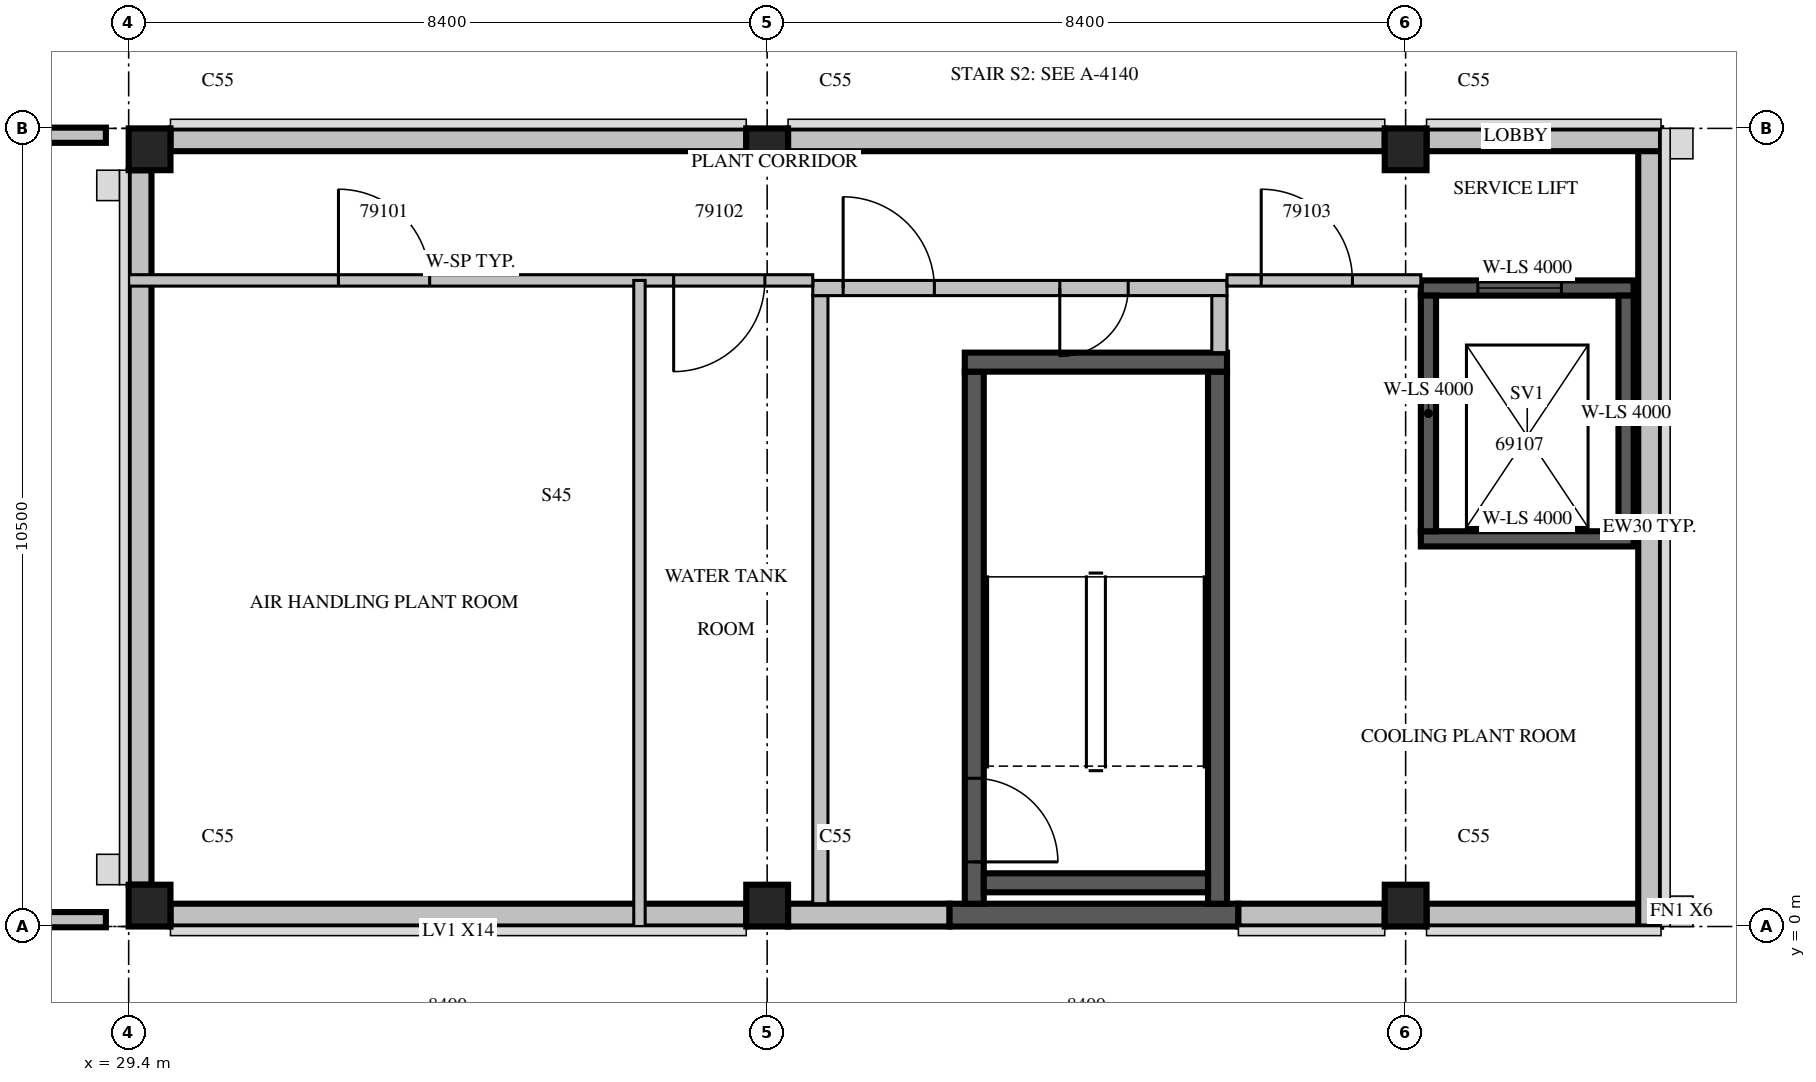
"""IFC4 building model, lengths in metres.
Left out: names, types, materials, properties, quantities, classifications, styles, units other than length and angle.
Written with IfcOpenShell. Run it as: python <this file> out.ifc"""

import sys

from ifc_helpers import new_model, si_unit, direction, frame, frame_2d, origin, origin_2d, place, context, subcontext, project, spatial, rectangle, extrude, source, transform, mapped, element, fill, save


model = new_model("IFC4")
c1 = context("Model", 3, precision=1e-05, world=origin(), true_north=direction((0.0, 1.0)))
c2 = subcontext(c1, "Body", "Model", "MODEL_VIEW")
j1 = project(units=[si_unit("LENGTHUNIT", "METRE"), si_unit("PLANEANGLEUNIT", "RADIAN")], contexts=[c1])
p1 = place(None, origin())
s1 = spatial("IfcSite", under=j1, at=p1, CompositionType="ELEMENT")
p2 = place(p1, origin())
s2 = spatial("IfcBuilding", under=s1, at=p2, CompositionType="ELEMENT")
p3 = place(p2, frame((0.0, 0.0, 368.5)))
s3 = spatial("IfcBuildingStorey", under=s2, at=p3, CompositionType="ELEMENT", Elevation=368.5)
p4 = place(p3, frame((29.675, 0.275, 0.0), z_axis=(0.0, 0.0, 1.0), x_axis=(1.0, 0.0, 0.0)))
e1 = element("IfcColumn", 1, at=p4, inside=s3, PredefinedType="COLUMN", context=c2, shape_type="SweptSolid", body=[
    extrude(rectangle(XDim=0.55, YDim=0.55, at=origin_2d()), origin(), (0.0, 0.0, 1.0), 4.0),
])
m1 = source(origin(), c2, "Body", "SweptSolid", [
    extrude(rectangle(XDim=0.55, YDim=0.55, at=origin_2d()), origin(), (0.0, 0.0, 1.0), 4.0),
])
for number, where, z_axis, x_axis in (
    (2, (37.8, 0.275, 0.0), (0.0, 0.0, 1.0), (1.0, 0.0, 0.0)),
    (3, (46.2, 0.275, 0.0), (0.0, 0.0, 1.0), (1.0, 0.0, 0.0)),
    (4, (29.675, 10.225, 0.0), (0.0, 0.0, 1.0), (1.0, 0.0, 0.0)),
    (5, (37.8, 10.225, 0.0), (0.0, 0.0, 1.0), (1.0, 0.0, 0.0)),
    (6, (46.2, 10.225, 0.0), (0.0, 0.0, 1.0), (1.0, 0.0, 0.0)),
):
    element("IfcColumn", number, at=place(p3, frame(where, z_axis=z_axis, x_axis=x_axis)), inside=s3, PredefinedType="COLUMN", context=c2, shape_type="MappedRepresentation", body=[
        mapped(m1, transform((0.0, 0.0, 0.0), scale=1.0)),
    ])
p5 = place(p3, frame((29.95, 0.15, 0.0), z_axis=(0.0, 0.0, 1.0), x_axis=(1.0, 0.0, 0.0)))
e7 = element("IfcWall", 7, at=p5, inside=s3, PredefinedType="STANDARD", context=c2, shape_type="SweptSolid", body=[
    extrude(rectangle(XDim=7.575, YDim=0.3, at=frame_2d((3.788, 0.0))), origin(), (0.0, 0.0, 1.0), 3.136),
])
p6 = place(p3, frame((38.075, 0.15, 0.0), z_axis=(0.0, 0.0, 1.0), x_axis=(1.0, 0.0, 0.0)))
e8 = element("IfcWall", 8, at=p6, inside=s3, PredefinedType="STANDARD", context=c2, shape_type="SweptSolid", body=[
    extrude(rectangle(XDim=2.125, YDim=0.3, at=frame_2d((1.062, 0.0))), origin(), (0.0, 0.0, 1.0), 3.136),
])
p7 = place(p3, frame((40.2, 0.15, 0.0), z_axis=(0.0, 0.0, 1.0), x_axis=(1.0, 0.0, 0.0)))
e9 = element("IfcWall", 9, at=p7, inside=s3, PredefinedType="SOLIDWALL", context=c2, shape_type="SweptSolid", body=[
    extrude(rectangle(XDim=3.8, YDim=0.3, at=frame_2d((1.9, 0.0))), origin(), (0.0, 0.0, 1.0), 3.136),
])
p8 = place(p3, frame((44.0, 0.15, 0.0), z_axis=(0.0, 0.0, 1.0), x_axis=(1.0, 0.0, 0.0)))
e10 = element("IfcWall", 10, at=p8, inside=s3, PredefinedType="STANDARD", context=c2, shape_type="SweptSolid", body=[
    extrude(rectangle(XDim=1.925, YDim=0.3, at=frame_2d((0.963, 0.0))), origin(), (0.0, 0.0, 1.0), 3.136),
])
p9 = place(p3, frame((46.475, 0.15, 0.0), z_axis=(0.0, 0.0, 1.0), x_axis=(1.0, 0.0, 0.0)))
e11 = element("IfcWall", 11, at=p9, inside=s3, PredefinedType="STANDARD", context=c2, shape_type="SweptSolid", body=[
    extrude(rectangle(XDim=3.085, YDim=0.3, at=frame_2d((1.542, 0.0))), origin(), (0.0, 0.0, 1.0), 3.136),
])
p10 = place(p3, frame((49.41, 0.0, 0.0), z_axis=(0.0, 0.0, 1.0), x_axis=(0.0, 1.0, 0.0)))
e12 = element("IfcWall", 12, at=p10, inside=s3, PredefinedType="STANDARD", context=c2, shape_type="SweptSolid", body=[
    extrude(rectangle(XDim=10.5, YDim=0.3, at=frame_2d((5.25, 0.0))), origin(), (0.0, 0.0, 1.0), 3.136),
])
m2 = source(origin(), c2, "Body", "SweptSolid", [
    extrude(rectangle(XDim=3.085, YDim=0.3, at=frame_2d((1.542, 0.0))), origin(), (0.0, 0.0, 1.0), 3.136),
])
p11 = place(p3, frame((49.56, 10.35, 0.0), z_axis=(0.0, 0.0, 1.0), x_axis=(-1.0, 0.0, 0.0)))
e13 = element("IfcWall", 13, at=p11, inside=s3, PredefinedType="STANDARD", context=c2, shape_type="MappedRepresentation", body=[
    mapped(m2, transform((0.0, 0.0, 0.0), scale=1.0)),
])
p12 = place(p3, frame((45.925, 10.35, 0.0), z_axis=(0.0, 0.0, 1.0), x_axis=(-1.0, 0.0, 0.0)))
e14 = element("IfcWall", 14, at=p12, inside=s3, PredefinedType="STANDARD", context=c2, shape_type="SweptSolid", body=[
    extrude(rectangle(XDim=7.85, YDim=0.3, at=frame_2d((3.925, 0.0))), origin(), (0.0, 0.0, 1.0), 3.136),
])
m3 = source(origin(), c2, "Body", "SweptSolid", [
    extrude(rectangle(XDim=7.575, YDim=0.3, at=frame_2d((3.788, 0.0))), origin(), (0.0, 0.0, 1.0), 3.136),
])
p13 = place(p3, frame((37.525, 10.35, 0.0), z_axis=(0.0, 0.0, 1.0), x_axis=(-1.0, 0.0, 0.0)))
e15 = element("IfcWall", 15, at=p13, inside=s3, PredefinedType="STANDARD", context=c2, shape_type="MappedRepresentation", body=[
    mapped(m3, transform((0.0, 0.0, 0.0), scale=1.0)),
])
p14 = place(p3, frame((29.55, 9.95, 0.0), z_axis=(0.0, 0.0, 1.0), x_axis=(0.0, -1.0, 0.0)))
e16 = element("IfcWall", 16, at=p14, inside=s3, PredefinedType="STANDARD", context=c2, shape_type="SweptSolid", body=[
    extrude(rectangle(XDim=9.4, YDim=0.3, at=frame_2d((4.7, 0.0))), origin(), (0.0, 0.0, 1.0), 3.136),
])
p15 = place(p3, frame((29.1, 0.09, 0.0), z_axis=(0.0, 0.0, 1.0), x_axis=(-1.0, 0.0, 0.0)))
e17 = element("IfcWall", 17, at=p15, inside=s3, PredefinedType="PARAPET", context=c2, shape_type="SweptSolid", body=[
    extrude(rectangle(XDim=24.81, YDim=0.2, at=frame_2d((12.405, 0.0))), origin(), (0.0, 0.0, 1.0), 1.1),
])
p16 = place(p3, frame((21.95, 10.41, 0.0), z_axis=(0.0, 0.0, 1.0), x_axis=(1.0, 0.0, 0.0)))
e18 = element("IfcWall", 18, at=p16, inside=s3, PredefinedType="PARAPET", context=c2, shape_type="SweptSolid", body=[
    extrude(rectangle(XDim=7.15, YDim=0.2, at=frame_2d((3.575, 0.0))), origin(), (0.0, 0.0, 1.0), 1.1),
])
p17 = place(p3, frame((46.4, 5.1, 0.0), z_axis=(0.0, 0.0, 1.0), x_axis=(1.0, 0.0, 0.0)))
e19 = element("IfcWall", 19, at=p17, inside=s3, PredefinedType="SOLIDWALL", context=c2, shape_type="SweptSolid", body=[
    extrude(rectangle(XDim=2.8, YDim=0.2, at=frame_2d((1.4, 0.0))), origin(), (0.0, 0.0, 1.0), 4.0),
])
m4 = source(origin(), c2, "Body", "SweptSolid", [
    extrude(rectangle(XDim=2.8, YDim=0.2, at=frame_2d((1.4, 0.0))), origin(), (0.0, 0.0, 1.0), 4.0),
])
p18 = place(p3, frame((46.4, 8.4, 0.0), z_axis=(0.0, 0.0, 1.0), x_axis=(1.0, 0.0, 0.0)))
e20 = element("IfcWall", 20, at=p18, inside=s3, PredefinedType="SOLIDWALL", context=c2, shape_type="MappedRepresentation", body=[
    mapped(m4, transform((0.0, 0.0, 0.0), scale=1.0)),
])
m5 = source(origin(), c2, "Body", "SweptSolid", [
    extrude(rectangle(XDim=1.1, YDim=2.1, at=frame_2d((0.55, 1.05))), frame((0.0, 0.11, 0.0), z_axis=(0.0, -1.0, 0.0), x_axis=(1.0, 0.0, 0.0)), (0.0, 0.0, 1.0), 0.22),
])
p19 = place(p18, frame((0.75, 0.0, 0.0)))
e21 = element("IfcOpeningElement", 21, at=p19, cuts=e20, PredefinedType="OPENING", context=c2, shape_type="MappedRepresentation", body=[
    mapped(m5, transform((0.0, 0.0, 0.0), scale=1.0)),
])
p20 = place(p3, frame((46.5, 5.2, 0.0), z_axis=(0.0, 0.0, 1.0), x_axis=(0.0, 1.0, 0.0)))
e22 = element("IfcWall", 22, at=p20, inside=s3, PredefinedType="SOLIDWALL", context=c2, shape_type="SweptSolid", body=[
    extrude(rectangle(XDim=3.1, YDim=0.2, at=frame_2d((1.55, 0.0))), origin(), (0.0, 0.0, 1.0), 4.0),
])
m6 = source(origin(), c2, "Body", "SweptSolid", [
    extrude(rectangle(XDim=3.1, YDim=0.2, at=frame_2d((1.55, 0.0))), origin(), (0.0, 0.0, 1.0), 4.0),
])
p21 = place(p3, frame((49.1, 5.2, 0.0), z_axis=(0.0, 0.0, 1.0), x_axis=(0.0, 1.0, 0.0)))
e23 = element("IfcWall", 23, at=p21, inside=s3, PredefinedType="SOLIDWALL", context=c2, shape_type="MappedRepresentation", body=[
    mapped(m6, transform((0.0, 0.0, 0.0), scale=1.0)),
])
p22 = place(p3, frame((40.525, 0.3, 0.0), z_axis=(0.0, 0.0, 1.0), x_axis=(0.0, 1.0, 0.0)))
e24 = element("IfcWall", 24, at=p22, inside=s3, PredefinedType="SOLIDWALL", context=c2, shape_type="SweptSolid", body=[
    extrude(rectangle(XDim=7.0, YDim=0.25, at=frame_2d((3.5, 0.0))), origin(), (0.0, 0.0, 1.0), 3.55),
])
m7 = source(origin(), c2, "Body", "SweptSolid", [
    extrude(rectangle(XDim=1.1, YDim=2.1, at=frame_2d((0.55, 1.05))), frame((0.0, 0.135, 0.0), z_axis=(0.0, -1.0, 0.0), x_axis=(1.0, 0.0, 0.0)), (0.0, 0.0, 1.0), 0.27),
])
p23 = place(p22, frame((0.55, 0.0, 0.0)))
e25 = element("IfcOpeningElement", 25, at=p23, cuts=e24, PredefinedType="OPENING", context=c2, shape_type="MappedRepresentation", body=[
    mapped(m7, transform((0.0, 0.0, 0.0), scale=1.0)),
])
m8 = source(origin(), c2, "Body", "SweptSolid", [
    extrude(rectangle(XDim=7.0, YDim=0.25, at=frame_2d((3.5, 0.0))), origin(), (0.0, 0.0, 1.0), 3.55),
])
p24 = place(p3, frame((43.725, 0.3, 0.0), z_axis=(0.0, 0.0, 1.0), x_axis=(0.0, 1.0, 0.0)))
e26 = element("IfcWall", 26, at=p24, inside=s3, PredefinedType="SOLIDWALL", context=c2, shape_type="MappedRepresentation", body=[
    mapped(m8, transform((0.0, 0.0, 0.0), scale=1.0)),
])
p25 = place(p3, frame((40.4, 7.425, 0.0), z_axis=(0.0, 0.0, 1.0), x_axis=(1.0, 0.0, 0.0)))
e27 = element("IfcWall", 27, at=p25, inside=s3, PredefinedType="SOLIDWALL", context=c2, shape_type="SweptSolid", body=[
    extrude(rectangle(XDim=3.45, YDim=0.25, at=frame_2d((1.725, 0.0))), origin(), (0.0, 0.0, 1.0), 3.55),
])
p26 = place(p3, frame((40.65, 0.575, 0.0), z_axis=(0.0, 0.0, 1.0), x_axis=(1.0, 0.0, 0.0)))
e28 = element("IfcWall", 28, at=p26, inside=s3, PredefinedType="SOLIDWALL", context=c2, shape_type="SweptSolid", body=[
    extrude(rectangle(XDim=2.95, YDim=0.25, at=frame_2d((1.475, 0.0))), origin(), (0.0, 0.0, 1.0), 3.55),
])
p27 = place(p3, frame((38.5, 0.3, 0.0), z_axis=(0.0, 0.0, 1.0), x_axis=(0.0, 1.0, 0.0)))
e29 = element("IfcWall", 29, at=p27, inside=s3, PredefinedType="PARTITIONING", context=c2, shape_type="SweptSolid", body=[
    extrude(rectangle(XDim=8.0, YDim=0.2, at=frame_2d((4.0, 0.0))), origin(), (0.0, 0.0, 1.0), 3.55),
])
p28 = place(p3, frame((38.4, 8.4, 0.0), z_axis=(0.0, 0.0, 1.0), x_axis=(1.0, 0.0, 0.0)))
e30 = element("IfcWall", 30, at=p28, inside=s3, PredefinedType="PARTITIONING", context=c2, shape_type="SweptSolid", body=[
    extrude(rectangle(XDim=5.45, YDim=0.2, at=frame_2d((2.725, 0.0))), origin(), (0.0, 0.0, 1.0), 3.55),
])
m9 = source(origin(), c2, "Body", "SweptSolid", [
    extrude(rectangle(XDim=1.2, YDim=2.1, at=frame_2d((0.6, 1.05))), frame((0.0, 0.11, 0.0), z_axis=(0.0, -1.0, 0.0), x_axis=(1.0, 0.0, 0.0)), (0.0, 0.0, 1.0), 0.22),
])
p29 = place(p28, frame((0.4, 0.0, 0.0)))
e31 = element("IfcOpeningElement", 31, at=p29, cuts=e30, PredefinedType="OPENING", context=c2, shape_type="MappedRepresentation", body=[
    mapped(m9, transform((0.0, 0.0, 0.0), scale=1.0)),
])
m10 = source(origin(), c2, "Body", "SweptSolid", [
    extrude(rectangle(XDim=0.9, YDim=2.1, at=frame_2d((0.45, 1.05))), frame((0.0, 0.11, 0.0), z_axis=(0.0, -1.0, 0.0), x_axis=(1.0, 0.0, 0.0)), (0.0, 0.0, 1.0), 0.22),
])
p30 = place(p28, frame((3.25, 0.0, 0.0)))
e32 = element("IfcOpeningElement", 32, at=p30, cuts=e30, PredefinedType="OPENING", context=c2, shape_type="MappedRepresentation", body=[
    mapped(m10, transform((0.0, 0.0, 0.0), scale=1.0)),
])
p31 = place(p3, frame((43.75, 7.55, 0.0), z_axis=(0.0, 0.0, 1.0), x_axis=(0.0, 1.0, 0.0)))
e33 = element("IfcWall", 33, at=p31, inside=s3, PredefinedType="PARTITIONING", context=c2, shape_type="SweptSolid", body=[
    extrude(rectangle(XDim=0.75, YDim=0.2, at=frame_2d((0.375, 0.0))), origin(), (0.0, 0.0, 1.0), 3.55),
])
p32 = place(p3, frame((29.4, 8.5, 0.0), z_axis=(0.0, 0.0, 1.0), x_axis=(1.0, 0.0, 0.0)))
e34 = element("IfcWall", 34, at=p32, inside=s3, PredefinedType="PARTITIONING", context=c2, shape_type="SweptSolid", body=[
    extrude(rectangle(XDim=9.0, YDim=0.15, at=frame_2d((4.5, 0.0))), origin(), (0.0, 0.0, 1.0), 3.55),
])
m11 = source(origin(), c2, "Body", "SweptSolid", [
    extrude(rectangle(XDim=1.2, YDim=2.1, at=frame_2d((0.6, 1.05))), frame((0.0, 0.085, 0.0), z_axis=(0.0, -1.0, 0.0), x_axis=(1.0, 0.0, 0.0)), (0.0, 0.0, 1.0), 0.17),
])
p33 = place(p32, frame((2.76, 0.0, 0.0)))
e35 = element("IfcOpeningElement", 35, at=p33, cuts=e34, PredefinedType="OPENING", context=c2, shape_type="MappedRepresentation", body=[
    mapped(m11, transform((0.0, 0.0, 0.0), scale=1.0)),
])
p34 = place(p32, frame((7.17, 0.0, 0.0)))
e36 = element("IfcOpeningElement", 36, at=p34, cuts=e34, PredefinedType="OPENING", context=c2, shape_type="MappedRepresentation", body=[
    mapped(m11, transform((0.0, 0.0, 0.0), scale=1.0)),
])
p35 = place(p3, frame((43.85, 8.5, 0.0), z_axis=(0.0, 0.0, 1.0), x_axis=(1.0, 0.0, 0.0)))
e37 = element("IfcWall", 37, at=p35, inside=s3, PredefinedType="PARTITIONING", context=c2, shape_type="SweptSolid", body=[
    extrude(rectangle(XDim=2.55, YDim=0.15, at=frame_2d((1.275, 0.0))), origin(), (0.0, 0.0, 1.0), 3.55),
])
p36 = place(p35, frame((0.45, 0.0, 0.0)))
e38 = element("IfcOpeningElement", 38, at=p36, cuts=e37, PredefinedType="OPENING", context=c2, shape_type="MappedRepresentation", body=[
    mapped(m11, transform((0.0, 0.0, 0.0), scale=1.0)),
])
p37 = place(p3, frame((36.12, 0.0, 0.0), z_axis=(0.0, 0.0, 1.0), x_axis=(0.0, 1.0, 0.0)))
e39 = element("IfcWall", 39, at=p37, inside=s3, PredefinedType="PARTITIONING", context=c2, shape_type="SweptSolid", body=[
    extrude(rectangle(XDim=8.5, YDim=0.15, at=frame_2d((4.25, 0.0))), origin(), (0.0, 0.0, 1.0), 3.55),
])
m12 = source(origin(), c2, "Body", "SweptSolid", [
    extrude(rectangle(XDim=1.1, YDim=2.1, at=frame_2d((0.55, 1.05))), frame((0.0, 0.025, 0.0), z_axis=(0.0, -1.0, 0.0), x_axis=(1.0, 0.0, 0.0)), (0.0, 0.0, 1.0), 0.05),
])
p38 = place(p19, origin())
e40 = element("IfcDoor", 40, at=p38, inside=s3, OperationType="SLIDING_TO_LEFT", PredefinedType="DOOR", context=c2, shape_type="MappedRepresentation", body=[
    mapped(m12, transform((0.0, 0.0, 0.0), scale=1.0)),
])
fill(e21, e40)
p39 = place(p23, origin())
e41 = element("IfcDoor", 41, at=p39, inside=s3, OperationType="SINGLE_SWING_RIGHT", PredefinedType="DOOR", context=c2, shape_type="MappedRepresentation", body=[
    mapped(m12, transform((0.0, 0.0, 0.0), scale=1.0)),
])
fill(e25, e41)
m13 = source(origin(), c2, "Body", "SweptSolid", [
    extrude(rectangle(XDim=1.2, YDim=2.1, at=frame_2d((0.6, 1.05))), frame((0.0, 0.025, 0.0), z_axis=(0.0, -1.0, 0.0), x_axis=(1.0, 0.0, 0.0)), (0.0, 0.0, 1.0), 0.05),
])
p40 = place(p29, origin())
e42 = element("IfcDoor", 42, at=p40, inside=s3, OperationType="SINGLE_SWING_LEFT", PredefinedType="DOOR", context=c2, shape_type="MappedRepresentation", body=[
    mapped(m13, transform((0.0, 0.0, 0.0), scale=1.0)),
])
fill(e31, e42)
m14 = source(origin(), c2, "Body", "SweptSolid", [
    extrude(rectangle(XDim=0.9, YDim=2.1, at=frame_2d((0.45, 1.05))), frame((0.0, 0.025, 0.0), z_axis=(0.0, -1.0, 0.0), x_axis=(1.0, 0.0, 0.0)), (0.0, 0.0, 1.0), 0.05),
])
p41 = place(p30, origin())
e43 = element("IfcDoor", 43, at=p41, inside=s3, OperationType="SINGLE_SWING_RIGHT", PredefinedType="DOOR", context=c2, shape_type="MappedRepresentation", body=[
    mapped(m14, transform((0.0, 0.0, 0.0), scale=1.0)),
])
fill(e32, e43)
p42 = place(p33, origin())
e44 = element("IfcDoor", 44, at=p42, inside=s3, OperationType="SINGLE_SWING_LEFT", PredefinedType="DOOR", context=c2, shape_type="MappedRepresentation", body=[
    mapped(m13, transform((0.0, 0.0, 0.0), scale=1.0)),
])
fill(e35, e44)
p43 = place(p34, origin())
e45 = element("IfcDoor", 45, at=p43, inside=s3, OperationType="SINGLE_SWING_RIGHT", PredefinedType="DOOR", context=c2, shape_type="MappedRepresentation", body=[
    mapped(m13, transform((0.0, 0.0, 0.0), scale=1.0)),
])
fill(e36, e45)
p44 = place(p36, origin())
e46 = element("IfcDoor", 46, at=p44, inside=s3, OperationType="SINGLE_SWING_LEFT", PredefinedType="DOOR", context=c2, shape_type="MappedRepresentation", body=[
    mapped(m13, transform((0.0, 0.0, 0.0), scale=1.0)),
])
fill(e38, e46)
save(model, sys.argv[1])
